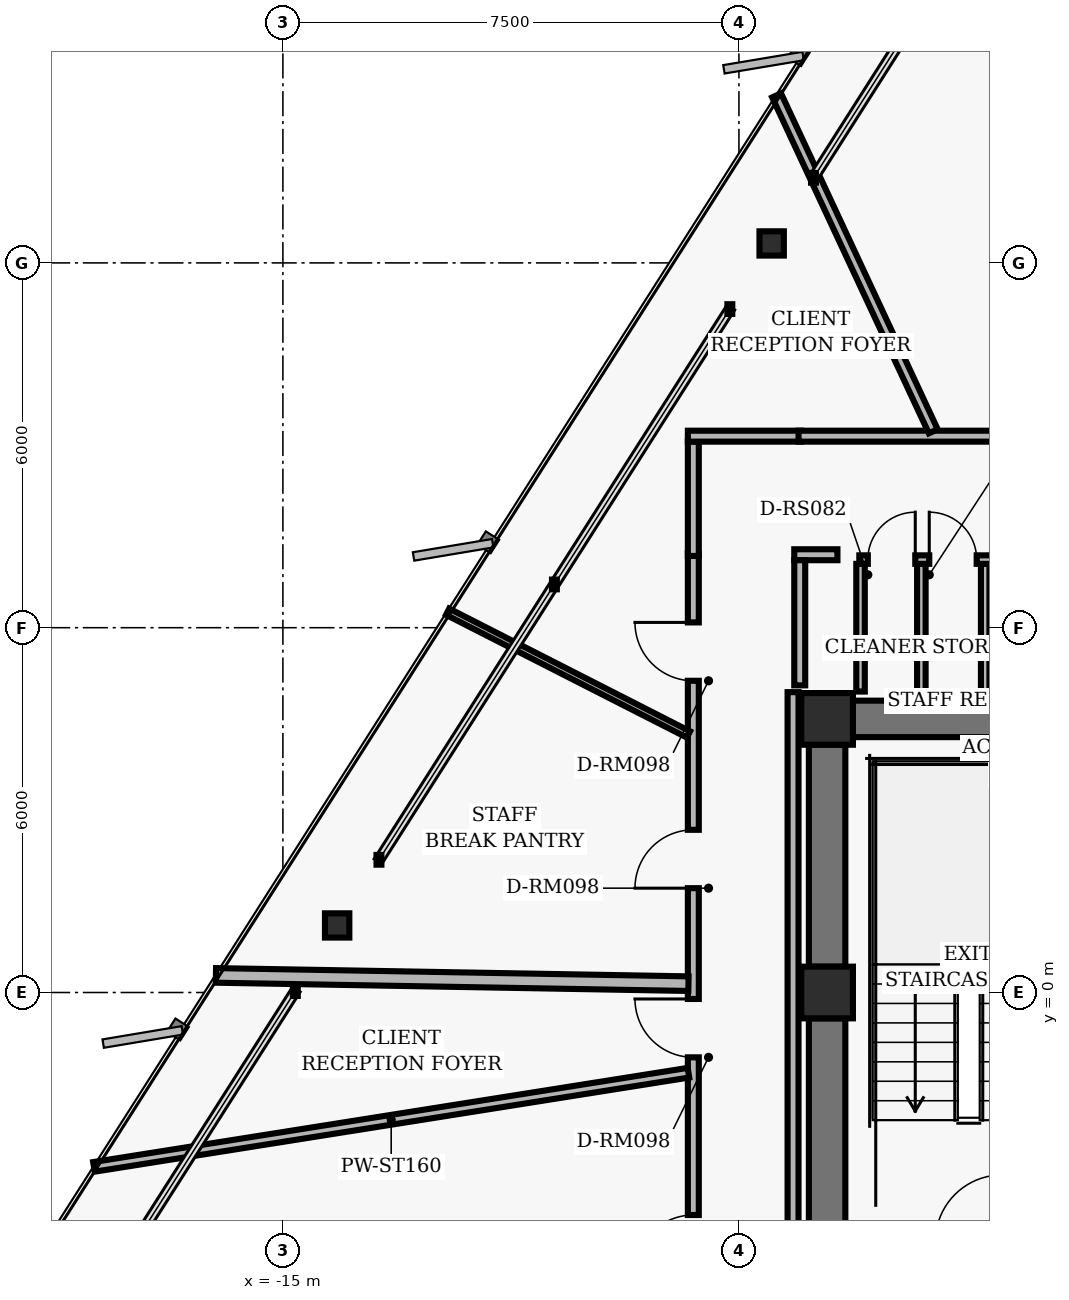
"""IFC4 building model, lengths in metres.
Left out: names, types, materials, properties, quantities, classifications, styles, units other than length and angle.
Written with IfcOpenShell. Run it as: python <this file> out.ifc"""

import sys

from ifc_helpers import new_model, si_unit, direction, frame, frame_2d, origin, origin_2d, place, context, subcontext, project, spatial, rectangle, hollow_rectangle, i_section, extrude, element, fill, save


model = new_model("IFC4")
c1 = context("Model", 3, precision=1e-05, world=origin(), true_north=direction((0.0, 1.0)))
c2 = subcontext(c1, "Body", "Model", "MODEL_VIEW")
j1 = project(units=[si_unit("LENGTHUNIT", "METRE"), si_unit("PLANEANGLEUNIT", "RADIAN")], contexts=[c1])
p1 = place(None, origin())
s1 = spatial("IfcSite", under=j1, at=p1, CompositionType="ELEMENT")
p2 = place(p1, origin())
s2 = spatial("IfcBuilding", under=s1, at=p2, CompositionType="ELEMENT")
p3 = place(p2, frame((0.0, 0.0, 144.16)))
s3 = spatial("IfcBuildingStorey", under=s2, at=p3, CompositionType="ELEMENT", Elevation=144.16)
for number, where, z_axis, x_axis in (
    (1, (-6.05, 4.5, 0.0), (0.0, 0.0, 1.0), (1.0, 0.0, 0.0)),
    (2, (-6.05, 0.0, 0.0), (0.0, 0.0, 1.0), (1.0, 0.0, 0.0)),
):
    element("IfcColumn", number, at=place(p3, frame(where, z_axis=z_axis, x_axis=x_axis)), inside=s3, PredefinedType="COLUMN", context=c2, shape_type="SweptSolid", body=[
        extrude(hollow_rectangle(XDim=0.85, YDim=0.85, WallThickness=0.055, InnerFilletRadius=0.02, OuterFilletRadius=0.04, at=origin_2d()), origin(), (0.0, 0.0, 1.0), 3.04),
    ])
p4 = place(p3, frame((-6.05, 0.425, 0.0), z_axis=(0.0, 0.0, 1.0), x_axis=(0.0, 1.0, 0.0)))
e3 = element("IfcWall", 3, at=p4, inside=s3, PredefinedType="SHEAR", context=c2, shape_type="SweptSolid", body=[
    extrude(rectangle(XDim=3.65, YDim=0.6, at=frame_2d((1.825, 0.0))), origin(), (0.0, 0.0, 1.0), 2.618),
])
p5 = place(p3, frame((-6.05, -3.875, 0.0), z_axis=(0.0, 0.0, 1.0), x_axis=(0.0, 1.0, 0.0)))
e4 = element("IfcWall", 4, at=p5, inside=s3, PredefinedType="SHEAR", context=c2, shape_type="SweptSolid", body=[
    extrude(rectangle(XDim=3.45, YDim=0.6, at=frame_2d((1.725, 0.0))), origin(), (0.0, 0.0, 1.0), 2.618),
])
p6 = place(p3, frame((-5.625, 4.5, 0.0), z_axis=(0.0, 0.0, 1.0), x_axis=(1.0, 0.0, 0.0)))
e5 = element("IfcWall", 5, at=p6, inside=s3, PredefinedType="SHEAR", context=c2, shape_type="SweptSolid", body=[
    extrude(rectangle(XDim=3.575, YDim=0.6, at=frame_2d((1.788, 0.0))), origin(), (0.0, 0.0, 1.0), 2.618),
])
for number, where, z_axis, x_axis in (
    (6, (-6.962, 12.32, 0.0), (0.0, 0.0, 1.0), (1.0, 0.0, 0.0)),
    (7, (-14.108, 1.103, 0.0), (0.0, 0.0, 1.0), (1.0, 0.0, 0.0)),
):
    element("IfcColumn", number, at=place(p3, frame(where, z_axis=z_axis, x_axis=x_axis)), inside=s3, PredefinedType="COLUMN", context=c2, shape_type="SweptSolid", body=[
        extrude(i_section(OverallWidth=0.401, OverallDepth=0.399, WebThickness=0.025, FlangeThickness=0.04, FilletRadius=0.018, at=origin_2d()), origin(), (0.0, 0.0, 1.0), 3.04),
    ])
for number, where, z_axis, x_axis in (
    (8, (-5.5, 4.95, 0.0), (0.0, 0.0, 1.0), (0.0, 1.0, 0.0)),
    (9, (-4.5, 4.95, 0.0), (0.0, 0.0, 1.0), (0.0, 1.0, 0.0)),
    (10, (-3.45, 4.95, 0.0), (0.0, 0.0, 1.0), (0.0, 1.0, 0.0)),
):
    element("IfcWall", number, at=place(p3, frame(where, z_axis=z_axis, x_axis=x_axis)), inside=s3, PredefinedType="PARTITIONING", context=c2, shape_type="SweptSolid", body=[
        extrude(rectangle(XDim=2.1, YDim=0.14, at=frame_2d((1.05, 0.0))), origin(), (0.0, 0.0, 1.0), 2.593),
    ])
p7 = place(p3, frame((-5.52, 7.12, 0.0), z_axis=(0.0, 0.0, 1.0), x_axis=(1.0, 0.0, 0.0)))
e11 = element("IfcWall", 11, at=p7, inside=s3, PredefinedType="PARTITIONING", context=c2, shape_type="SweptSolid", body=[
    extrude(rectangle(XDim=3.52, YDim=0.14, at=frame_2d((1.76, 0.0))), origin(), (0.0, 0.0, 1.0), 2.16),
])
p8 = place(p7, frame((0.14, 0.0, 0.0)))
e12 = element("IfcOpeningElement", 12, at=p8, cuts=e11, PredefinedType="OPENING", context=c2, shape_type="SweptSolid", body=[
    extrude(rectangle(XDim=0.78, YDim=2.01, at=frame_2d((0.39, 1.005))), frame((0.0, 0.08, 0.0), z_axis=(0.0, -1.0, 0.0), x_axis=(1.0, 0.0, 0.0)), (0.0, 0.0, 1.0), 0.16),
])
p9 = place(p7, frame((1.15, 0.0, 0.0)))
e13 = element("IfcOpeningElement", 13, at=p9, cuts=e11, PredefinedType="OPENING", context=c2, shape_type="SweptSolid", body=[
    extrude(rectangle(XDim=0.78, YDim=2.01, at=frame_2d((0.39, 1.005))), frame((0.0, 0.08, 0.0), z_axis=(0.0, -1.0, 0.0), x_axis=(1.0, 0.0, 0.0)), (0.0, 0.0, 1.0), 0.16),
])
p10 = place(p7, frame((2.34, 0.0, 0.0)))
e14 = element("IfcOpeningElement", 14, at=p10, cuts=e11, PredefinedType="OPENING", context=c2, shape_type="SweptSolid", body=[
    extrude(rectangle(XDim=0.88, YDim=2.02, at=frame_2d((0.44, 1.01))), frame((0.0, 0.08, 0.0), z_axis=(0.0, -1.0, 0.0), x_axis=(1.0, 0.0, 0.0)), (0.0, 0.0, 1.0), 0.16),
])
p11 = place(p3, frame((-8.25, -7.22, 0.0), z_axis=(0.0, 0.0, 1.0), x_axis=(0.0, 1.0, 0.0)))
e15 = element("IfcWall", 15, at=p11, inside=s3, PredefinedType="PARTITIONING", context=c2, shape_type="SweptSolid", body=[
    extrude(rectangle(XDim=14.44, YDim=0.18, at=frame_2d((7.22, 0.0))), origin(), (0.0, 0.0, 1.0), 2.593),
])
p12 = place(p11, frame((6.154, 0.0, 0.0)))
e16 = element("IfcOpeningElement", 16, at=p12, cuts=e15, PredefinedType="OPENING", context=c2, shape_type="SweptSolid", body=[
    extrude(rectangle(XDim=0.96, YDim=2.02, at=frame_2d((0.48, 1.01))), frame((0.0, 0.1, 0.0), z_axis=(0.0, -1.0, 0.0), x_axis=(1.0, 0.0, 0.0)), (0.0, 0.0, 1.0), 0.2),
])
p13 = place(p11, frame((2.6, 0.0, 0.0)))
e17 = element("IfcOpeningElement", 17, at=p13, cuts=e15, PredefinedType="OPENING", context=c2, shape_type="SweptSolid", body=[
    extrude(rectangle(XDim=0.96, YDim=2.02, at=frame_2d((0.48, 1.01))), frame((0.0, 0.1, 0.0), z_axis=(0.0, -1.0, 0.0), x_axis=(1.0, 0.0, 0.0)), (0.0, 0.0, 1.0), 0.2),
])
p14 = place(p11, frame((12.347, 0.0, 0.0)))
e18 = element("IfcOpeningElement", 18, at=p14, cuts=e15, PredefinedType="OPENING", context=c2, shape_type="SweptSolid", body=[
    extrude(rectangle(XDim=0.96, YDim=2.02, at=frame_2d((0.48, 1.01))), frame((0.0, 0.1, 0.0), z_axis=(0.0, -1.0, 0.0), x_axis=(1.0, 0.0, 0.0)), (0.0, 0.0, 1.0), 0.2),
])
p15 = place(p11, frame((8.936, 0.0, 0.0)))
e19 = element("IfcOpeningElement", 19, at=p15, cuts=e15, PredefinedType="OPENING", context=c2, shape_type="SweptSolid", body=[
    extrude(rectangle(XDim=0.96, YDim=2.02, at=frame_2d((0.48, 1.01))), frame((0.0, 0.1, 0.0), z_axis=(0.0, -1.0, 0.0), x_axis=(1.0, 0.0, 0.0)), (0.0, 0.0, 1.0), 0.2),
])
p16 = place(p3, frame((-8.25, 7.18, 0.0), z_axis=(0.0, 0.0, 1.0), x_axis=(0.0, 1.0, 0.0)))
e20 = element("IfcWall", 20, at=p16, inside=s3, PredefinedType="PARTITIONING", context=c2, shape_type="SweptSolid", body=[
    extrude(rectangle(XDim=1.88, YDim=0.18, at=frame_2d((0.94, 0.0))), origin(), (0.0, 0.0, 1.0), 2.593),
])
p17 = place(p3, frame((-8.34, 9.15, 0.0), z_axis=(0.0, 0.0, 1.0), x_axis=(1.0, 0.0, 0.0)))
e21 = element("IfcWall", 21, at=p17, inside=s3, PredefinedType="PARTITIONING", context=c2, shape_type="SweptSolid", body=[
    extrude(rectangle(XDim=1.86, YDim=0.18, at=frame_2d((0.93, 0.0))), origin(), (0.0, 0.0, 1.0), 2.593),
])
p18 = place(p3, frame((-6.52, 9.15, 0.0), z_axis=(0.0, 0.0, 1.0), x_axis=(1.0, 0.0, 0.0)))
e22 = element("IfcWall", 22, at=p18, inside=s3, PredefinedType="PARTITIONING", context=c2, shape_type="SweptSolid", body=[
    extrude(rectangle(XDim=16.572, YDim=0.18, at=frame_2d((8.286, 0.0))), origin(), (0.0, 0.0, 1.0), 2.16),
])
p19 = place(p18, frame((9.714, 0.0, 0.0)))
e23 = element("IfcOpeningElement", 23, at=p19, cuts=e22, PredefinedType="OPENING", context=c2, shape_type="SweptSolid", body=[
    extrude(rectangle(XDim=1.18, YDim=2.02, at=frame_2d((0.59, 1.01))), frame((0.0, 0.1, 0.0), z_axis=(0.0, -1.0, 0.0), x_axis=(1.0, 0.0, 0.0)), (0.0, 0.0, 1.0), 0.2),
])
p20 = place(p18, frame((5.298, 0.0, 0.0)))
e24 = element("IfcOpeningElement", 24, at=p20, cuts=e22, PredefinedType="OPENING", context=c2, shape_type="SweptSolid", body=[
    extrude(rectangle(XDim=0.96, YDim=2.02, at=frame_2d((0.48, 1.01))), frame((0.0, 0.1, 0.0), z_axis=(0.0, -1.0, 0.0), x_axis=(1.0, 0.0, 0.0)), (0.0, 0.0, 1.0), 0.2),
])
p21 = place(p3, frame((-5.88, 7.2, 0.0), z_axis=(0.0, 0.0, 1.0), x_axis=(-1.0, 0.0, 0.0)))
e25 = element("IfcWall", 25, at=p21, inside=s3, PredefinedType="PARTITIONING", context=c2, shape_type="SweptSolid", body=[
    extrude(rectangle(XDim=0.71, YDim=0.18, at=frame_2d((0.355, 0.0))), origin(), (0.0, 0.0, 1.0), 2.16),
])
p22 = place(p3, frame((-6.5, 7.11, 0.0), z_axis=(0.0, 0.0, 1.0), x_axis=(0.0, -1.0, 0.0)))
e26 = element("IfcWall", 26, at=p22, inside=s3, PredefinedType="PARTITIONING", context=c2, shape_type="SweptSolid", body=[
    extrude(rectangle(XDim=2.058, YDim=0.18, at=frame_2d((1.029, 0.0))), origin(), (0.0, 0.0, 1.0), 1.962),
])
p23 = place(p3, frame((-6.61, 4.94, 0.0), z_axis=(0.0, 0.0, 1.0), x_axis=(0.0, -1.0, 0.0)))
e27 = element("IfcWall", 27, at=p23, inside=s3, PredefinedType="PARTITIONING", context=c2, shape_type="SweptSolid", body=[
    extrude(rectangle(XDim=9.46, YDim=0.18, at=frame_2d((4.73, 0.0))), origin(), (0.0, 0.0, 1.0), 2.593),
])
p24 = place(p3, frame((-8.33, -1.319, 0.0), z_axis=(0.0, 0.0, 1.0), x_axis=(-0.987688868154, -0.156431134128, 0.0)))
e28 = element("IfcWall", 28, at=p24, inside=s3, PredefinedType="PARTITIONING", context=c2, shape_type="SweptSolid", body=[
    extrude(rectangle(XDim=9.899, YDim=0.16, at=frame_2d((4.95, 0.0))), origin(), (0.0, 0.0, 1.0), 2.593),
])
p25 = place(p3, frame((-4.304, 9.23, 0.0), z_axis=(0.0, 0.0, 1.0), x_axis=(-0.422635533016, 0.906299733108, 0.0)))
e29 = element("IfcWall", 29, at=p25, inside=s3, PredefinedType="PARTITIONING", context=c2, shape_type="SweptSolid", body=[
    extrude(rectangle(XDim=6.097, YDim=0.16, at=frame_2d((3.048, 0.0))), origin(), (0.0, 0.0, 1.0), 2.593),
])
p26 = place(p3, frame((-8.33, 4.244, 0.0), z_axis=(0.0, 0.0, 1.0), x_axis=(-0.890996324909, 0.454010516397, 0.0)))
e30 = element("IfcWall", 30, at=p26, inside=s3, PredefinedType="MOVABLE", context=c2, shape_type="SweptSolid", body=[
    extrude(rectangle(XDim=4.446, YDim=0.115, at=frame_2d((2.223, 0.0))), origin(), (0.0, 0.0, 1.0), 2.593),
])
p27 = place(p3, frame((-8.33, 0.146, 0.0), z_axis=(0.0, 0.0, 1.0), x_axis=(-0.999848040059, 0.017432635783, 0.0)))
e31 = element("IfcWall", 31, at=p27, inside=s3, PredefinedType="PARTITIONING", context=c2, shape_type="SweptSolid", body=[
    extrude(rectangle(XDim=7.773, YDim=0.24, at=frame_2d((3.886, 0.0))), origin(), (0.0, 0.0, 1.0), 1.962),
])
p28 = place(p8, origin())
e32 = element("IfcDoor", 32, at=p28, inside=s3, OperationType="SINGLE_SWING_RIGHT", PredefinedType="DOOR", context=c2, shape_type="SweptSolid", body=[
    extrude(rectangle(XDim=0.78, YDim=2.01, at=frame_2d((0.39, 1.005))), frame((0.0, 0.025, 0.0), z_axis=(0.0, -1.0, 0.0), x_axis=(1.0, 0.0, 0.0)), (0.0, 0.0, 1.0), 0.05),
])
fill(e12, e32)
p29 = place(p9, origin())
e33 = element("IfcDoor", 33, at=p29, inside=s3, OperationType="SINGLE_SWING_LEFT", PredefinedType="DOOR", context=c2, shape_type="SweptSolid", body=[
    extrude(rectangle(XDim=0.78, YDim=2.01, at=frame_2d((0.39, 1.005))), frame((0.0, 0.025, 0.0), z_axis=(0.0, -1.0, 0.0), x_axis=(1.0, 0.0, 0.0)), (0.0, 0.0, 1.0), 0.05),
])
fill(e13, e33)
p30 = place(p12, origin())
e34 = element("IfcDoor", 34, at=p30, inside=s3, OperationType="SINGLE_SWING_RIGHT", PredefinedType="DOOR", context=c2, shape_type="SweptSolid", body=[
    extrude(rectangle(XDim=0.96, YDim=2.02, at=frame_2d((0.48, 1.01))), frame((0.0, 0.025, 0.0), z_axis=(0.0, -1.0, 0.0), x_axis=(1.0, 0.0, 0.0)), (0.0, 0.0, 1.0), 0.05),
])
fill(e16, e34)
p31 = place(p13, origin())
e35 = element("IfcDoor", 35, at=p31, inside=s3, OperationType="SINGLE_SWING_LEFT", PredefinedType="DOOR", context=c2, shape_type="SweptSolid", body=[
    extrude(rectangle(XDim=0.96, YDim=2.02, at=frame_2d((0.48, 1.01))), frame((0.0, 0.025, 0.0), z_axis=(0.0, -1.0, 0.0), x_axis=(1.0, 0.0, 0.0)), (0.0, 0.0, 1.0), 0.05),
])
fill(e17, e35)
p32 = place(p14, origin())
e36 = element("IfcDoor", 36, at=p32, inside=s3, OperationType="SINGLE_SWING_RIGHT", PredefinedType="DOOR", context=c2, shape_type="SweptSolid", body=[
    extrude(rectangle(XDim=0.96, YDim=2.02, at=frame_2d((0.48, 1.01))), frame((0.0, 0.025, 0.0), z_axis=(0.0, -1.0, 0.0), x_axis=(1.0, 0.0, 0.0)), (0.0, 0.0, 1.0), 0.05),
])
fill(e18, e36)
p33 = place(p15, origin())
e37 = element("IfcDoor", 37, at=p33, inside=s3, OperationType="SINGLE_SWING_LEFT", PredefinedType="DOOR", context=c2, shape_type="SweptSolid", body=[
    extrude(rectangle(XDim=0.96, YDim=2.02, at=frame_2d((0.48, 1.01))), frame((0.0, 0.025, 0.0), z_axis=(0.0, -1.0, 0.0), x_axis=(1.0, 0.0, 0.0)), (0.0, 0.0, 1.0), 0.05),
])
fill(e19, e37)
save(model, sys.argv[1])
